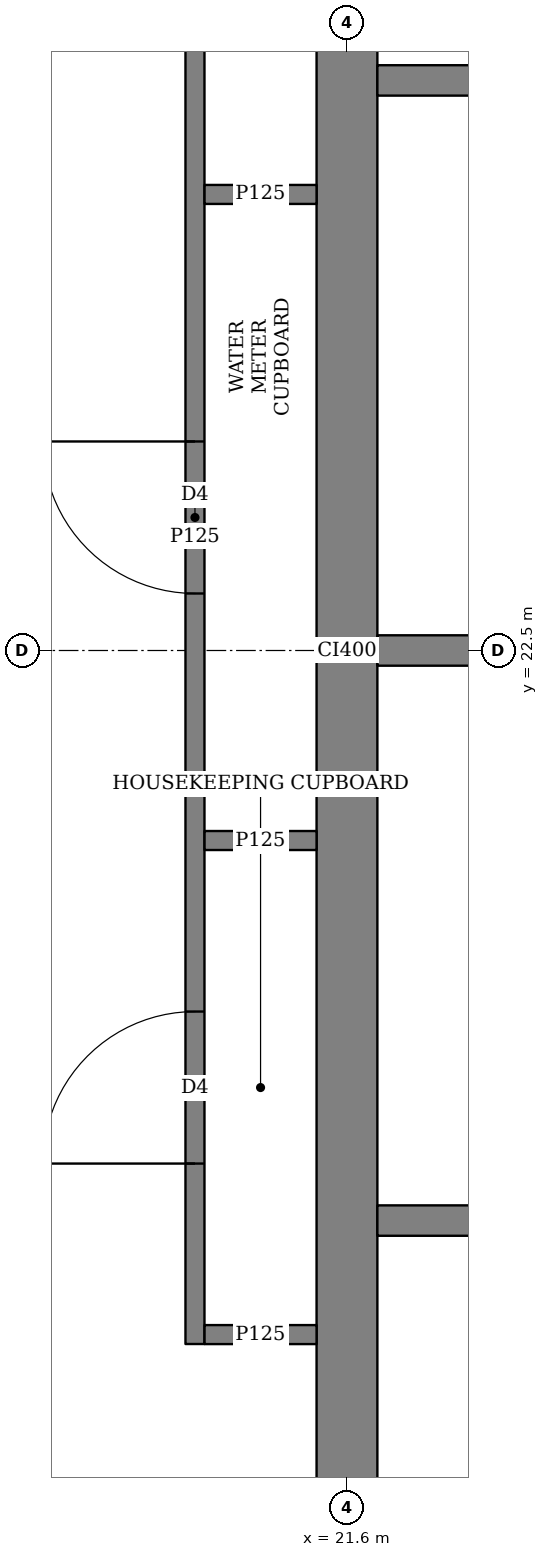
"""IFC4 building model, lengths in metres.
Left out: names, types, materials, properties, quantities, classifications, styles, units other than length and angle.
Written with IfcOpenShell. Run it as: python <this file> out.ifc"""

import sys

from ifc_helpers import new_model, si_unit, direction, frame, frame_2d, origin, place, context, subcontext, project, spatial, rectangle, extrude, element, fill, save


model = new_model("IFC4")
c1 = context("Model", 3, precision=1e-05, world=origin(), true_north=direction((0.0, 1.0)))
c2 = subcontext(c1, "Body", "Model", "MODEL_VIEW")
j1 = project(units=[si_unit("LENGTHUNIT", "METRE"), si_unit("PLANEANGLEUNIT", "RADIAN")], contexts=[c1])
p1 = place(None, origin())
s1 = spatial("IfcSite", under=j1, at=p1, CompositionType="ELEMENT")
p2 = place(p1, origin())
s2 = spatial("IfcBuilding", under=s1, at=p2, CompositionType="ELEMENT")
p3 = place(p2, frame((0.0, 0.0, 31.25)))
s3 = spatial("IfcBuildingStorey", under=s2, at=p3, CompositionType="ELEMENT", Elevation=31.25)
p4 = place(p3, frame((21.6, 15.45, 0.0), z_axis=(0.0, 0.0, 1.0), x_axis=(0.0, 1.0, 0.0)))
e1 = element("IfcWall", 1, at=p4, inside=s3, PredefinedType="SHEAR", context=c2, shape_type="SweptSolid", body=[
    extrude(rectangle(XDim=14.1, YDim=0.4, at=frame_2d((7.05, 0.0))), origin(), (0.0, 0.0, 1.0), 3.75),
])
p5 = place(p3, frame((20.6, 17.938, 0.0), z_axis=(0.0, 0.0, 1.0), x_axis=(0.0, 1.0, 0.0)))
e2 = element("IfcWall", 2, at=p5, inside=s3, PredefinedType="PARTITIONING", context=c2, shape_type="SweptSolid", body=[
    extrude(rectangle(XDim=10.624, YDim=0.125, at=frame_2d((5.312, 0.0))), origin(), (0.0, 0.0, 1.0), 3.5),
])
p6 = place(p5, frame((1.187, 0.0, 0.0)))
e3 = element("IfcOpeningElement", 3, at=p6, cuts=e2, PredefinedType="OPENING", context=c2, shape_type="SweptSolid", body=[
    extrude(rectangle(XDim=1.0, YDim=2.1, at=frame_2d((0.5, 1.05))), frame((0.0, 0.073, 0.0), z_axis=(0.0, -1.0, 0.0), x_axis=(1.0, 0.0, 0.0)), (0.0, 0.0, 1.0), 0.145),
])
p7 = place(p5, frame((4.937, 0.0, 0.0)))
e4 = element("IfcOpeningElement", 4, at=p7, cuts=e2, PredefinedType="OPENING", context=c2, shape_type="SweptSolid", body=[
    extrude(rectangle(XDim=1.0, YDim=2.1, at=frame_2d((0.5, 1.05))), frame((0.0, 0.073, 0.0), z_axis=(0.0, -1.0, 0.0), x_axis=(1.0, 0.0, 0.0)), (0.0, 0.0, 1.0), 0.145),
])
p8 = place(p5, frame((8.562, 0.0, 0.0)))
e5 = element("IfcOpeningElement", 5, at=p8, cuts=e2, PredefinedType="OPENING", context=c2, shape_type="SweptSolid", body=[
    extrude(rectangle(XDim=1.0, YDim=2.1, at=frame_2d((0.5, 1.05))), frame((0.0, 0.073, 0.0), z_axis=(0.0, -1.0, 0.0), x_axis=(1.0, 0.0, 0.0)), (0.0, 0.0, 1.0), 0.145),
])
for number, where, z_axis, x_axis in (
    (6, (20.663, 18.0, 0.0), (0.0, 0.0, 1.0), (1.0, 0.0, 0.0)),
    (7, (20.663, 21.25, 0.0), (0.0, 0.0, 1.0), (1.0, 0.0, 0.0)),
    (8, (20.663, 25.5, 0.0), (0.0, 0.0, 1.0), (1.0, 0.0, 0.0)),
):
    element("IfcWall", number, at=place(p3, frame(where, z_axis=z_axis, x_axis=x_axis)), inside=s3, PredefinedType="PARTITIONING", context=c2, shape_type="SweptSolid", body=[
        extrude(rectangle(XDim=0.737, YDim=0.125, at=frame_2d((0.368, 0.0))), origin(), (0.0, 0.0, 1.0), 3.5),
    ])
for number, where, z_axis, x_axis in (
    (9, (21.8, 18.75, 0.0), (0.0, 0.0, 1.0), (1.0, 0.0, 0.0)),
    (10, (21.8, 22.5, 0.0), (0.0, 0.0, 1.0), (1.0, 0.0, 0.0)),
    (11, (21.8, 26.25, 0.0), (0.0, 0.0, 1.0), (1.0, 0.0, 0.0)),
):
    element("IfcWall", number, at=place(p3, frame(where, z_axis=z_axis, x_axis=x_axis)), inside=s3, PredefinedType="SOLIDWALL", context=c2, shape_type="SweptSolid", body=[
        extrude(rectangle(XDim=2.2, YDim=0.2, at=frame_2d((1.1, 0.0))), origin(), (0.0, 0.0, 1.0), 3.5),
    ])
p9 = place(p6, origin())
e12 = element("IfcDoor", 12, at=p9, inside=s3, OperationType="SINGLE_SWING_LEFT", PredefinedType="DOOR", context=c2, shape_type="SweptSolid", body=[
    extrude(rectangle(XDim=1.0, YDim=2.1, at=frame_2d((0.5, 1.05))), frame((0.0, 0.025, 0.0), z_axis=(0.0, -1.0, 0.0), x_axis=(1.0, 0.0, 0.0)), (0.0, 0.0, 1.0), 0.05),
])
fill(e3, e12)
p10 = place(p7, origin())
e13 = element("IfcDoor", 13, at=p10, inside=s3, OperationType="SINGLE_SWING_RIGHT", PredefinedType="DOOR", context=c2, shape_type="SweptSolid", body=[
    extrude(rectangle(XDim=1.0, YDim=2.1, at=frame_2d((0.5, 1.05))), frame((0.0, 0.025, 0.0), z_axis=(0.0, -1.0, 0.0), x_axis=(1.0, 0.0, 0.0)), (0.0, 0.0, 1.0), 0.05),
])
fill(e4, e13)
save(model, sys.argv[1])
